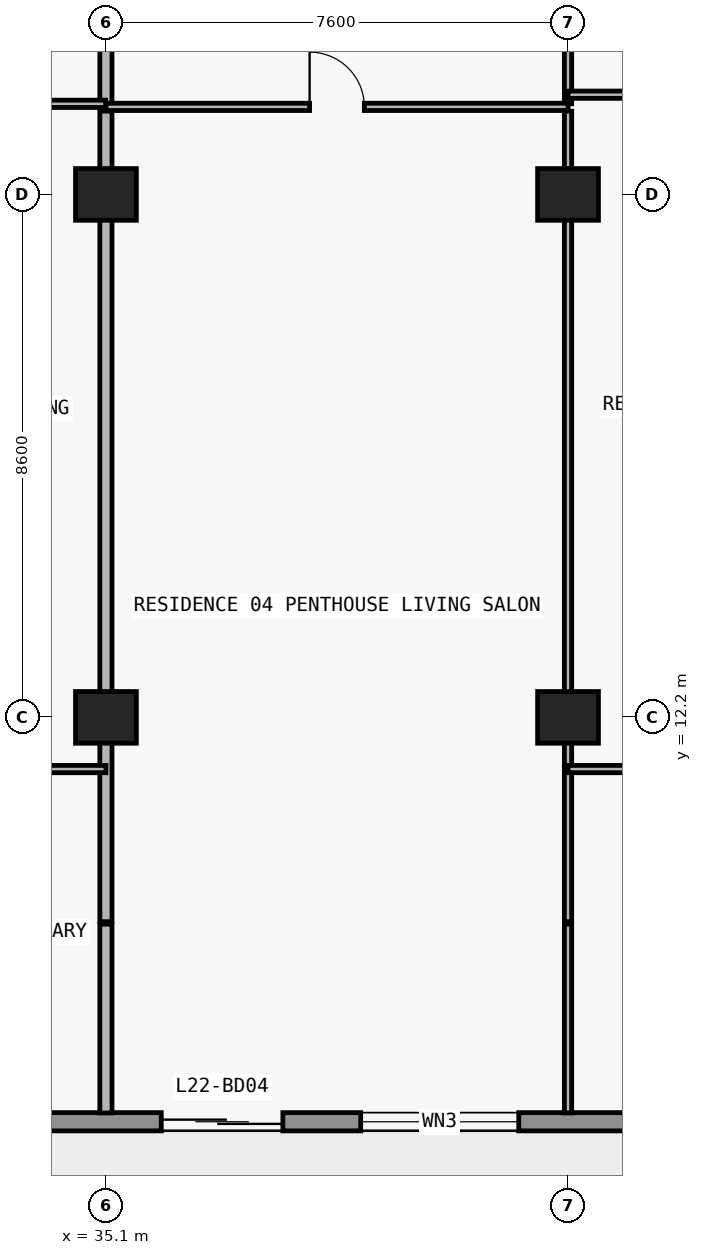
"""IFC4 building model, lengths in metres.
Left out: names, types, materials, properties, quantities, classifications, styles, units other than length and angle.
Written with IfcOpenShell. Run it as: python <this file> out.ifc"""

import sys

from ifc_helpers import new_model, si_unit, direction, frame, frame_2d, origin, origin_2d, place, context, subcontext, project, spatial, rectangle, extrude, element, fill, save


model = new_model("IFC4")
c1 = context("Model", 3, precision=1e-05, world=origin(), true_north=direction((0.0, 1.0)))
c2 = subcontext(c1, "Body", "Model", "MODEL_VIEW")
j1 = project(units=[si_unit("LENGTHUNIT", "METRE"), si_unit("PLANEANGLEUNIT", "RADIAN")], contexts=[c1])
p1 = place(None, origin())
s1 = spatial("IfcSite", under=j1, at=p1, CompositionType="ELEMENT")
p2 = place(p1, origin())
s2 = spatial("IfcBuilding", under=s1, at=p2, CompositionType="ELEMENT")
p3 = place(p2, frame((0.0, 0.0, 84.6)))
s3 = spatial("IfcBuildingStorey", under=s2, at=p3, CompositionType="ELEMENT", Elevation=84.6)
for number, where, z_axis, x_axis in (
    (1, (35.1, 12.2, 0.0), (0.0, 0.0, 1.0), (1.0, 0.0, 0.0)),
    (2, (42.7, 12.2, 0.0), (0.0, 0.0, 1.0), (1.0, 0.0, 0.0)),
    (3, (35.1, 20.8, 0.0), (0.0, 0.0, 1.0), (1.0, 0.0, 0.0)),
    (4, (42.7, 20.8, 0.0), (0.0, 0.0, 1.0), (1.0, 0.0, 0.0)),
):
    element("IfcColumn", number, at=place(p3, frame(where, z_axis=z_axis, x_axis=x_axis)), inside=s3, PredefinedType="COLUMN", context=c2, shape_type="SweptSolid", body=[
        extrude(rectangle(XDim=1.0, YDim=0.85, at=origin_2d()), origin(), (0.0, 0.0, 1.0), 3.05),
    ])
p4 = place(p3, frame((70.1, 5.55, 0.0), z_axis=(0.0, 0.0, 1.0), x_axis=(-1.0, 0.0, 0.0)))
e5 = element("IfcWall", 5, at=p4, inside=s3, PredefinedType="STANDARD", context=c2, shape_type="SweptSolid", body=[
    extrude(rectangle(XDim=62.4, YDim=0.3, at=frame_2d((31.2, 0.0))), origin(), (0.0, 0.0, 1.0), 3.05),
])
p5 = place(p4, frame((57.226, 0.0, 0.0)))
e6 = element("IfcOpeningElement", 6, at=p5, cuts=e5, PredefinedType="OPENING", context=c2, shape_type="SweptSolid", body=[
    extrude(rectangle(XDim=2.0, YDim=2.3, at=frame_2d((1.0, 1.15))), frame((0.0, 0.16, 0.0), z_axis=(0.0, -1.0, 0.0), x_axis=(1.0, 0.0, 0.0)), (0.0, 0.0, 1.0), 0.32),
])
p6 = place(p4, frame((52.926, 0.0, 0.85)))
e7 = element("IfcOpeningElement", 7, at=p6, cuts=e5, PredefinedType="OPENING", context=c2, shape_type="SweptSolid", body=[
    extrude(rectangle(XDim=2.2, YDim=1.55, at=frame_2d((1.1, 0.775))), frame((0.0, 0.16, 0.0), z_axis=(0.0, -1.0, 0.0), x_axis=(1.0, 0.0, 0.0)), (0.0, 0.0, 1.0), 0.32),
])
p7 = place(p4, frame((48.49, 0.0, 0.0)))
e8 = element("IfcOpeningElement", 8, at=p7, cuts=e5, PredefinedType="OPENING", context=c2, shape_type="SweptSolid", body=[
    extrude(rectangle(XDim=2.0, YDim=2.3, at=frame_2d((1.0, 1.15))), frame((0.0, 0.16, 0.0), z_axis=(0.0, -1.0, 0.0), x_axis=(1.0, 0.0, 0.0)), (0.0, 0.0, 1.0), 0.32),
])
p8 = place(p4, frame((44.39, 0.0, 0.85)))
e9 = element("IfcOpeningElement", 9, at=p8, cuts=e5, PredefinedType="OPENING", context=c2, shape_type="SweptSolid", body=[
    extrude(rectangle(XDim=1.8, YDim=1.55, at=frame_2d((0.9, 0.775))), frame((0.0, 0.16, 0.0), z_axis=(0.0, -1.0, 0.0), x_axis=(1.0, 0.0, 0.0)), (0.0, 0.0, 1.0), 0.32),
])
p9 = place(p4, frame((40.426, 0.0, 0.0)))
e10 = element("IfcOpeningElement", 10, at=p9, cuts=e5, PredefinedType="OPENING", context=c2, shape_type="SweptSolid", body=[
    extrude(rectangle(XDim=2.0, YDim=2.3, at=frame_2d((1.0, 1.15))), frame((0.0, 0.16, 0.0), z_axis=(0.0, -1.0, 0.0), x_axis=(1.0, 0.0, 0.0)), (0.0, 0.0, 1.0), 0.32),
])
p10 = place(p4, frame((36.126, 0.0, 0.85)))
e11 = element("IfcOpeningElement", 11, at=p10, cuts=e5, PredefinedType="OPENING", context=c2, shape_type="SweptSolid", body=[
    extrude(rectangle(XDim=2.2, YDim=1.55, at=frame_2d((1.1, 0.775))), frame((0.0, 0.16, 0.0), z_axis=(0.0, -1.0, 0.0), x_axis=(1.0, 0.0, 0.0)), (0.0, 0.0, 1.0), 0.32),
])
p11 = place(p4, frame((32.09, 0.0, 0.0)))
e12 = element("IfcOpeningElement", 12, at=p11, cuts=e5, PredefinedType="OPENING", context=c2, shape_type="SweptSolid", body=[
    extrude(rectangle(XDim=2.0, YDim=2.3, at=frame_2d((1.0, 1.15))), frame((0.0, 0.16, 0.0), z_axis=(0.0, -1.0, 0.0), x_axis=(1.0, 0.0, 0.0)), (0.0, 0.0, 1.0), 0.32),
])
p12 = place(p4, frame((28.21, 0.0, 0.65)))
e13 = element("IfcOpeningElement", 13, at=p12, cuts=e5, PredefinedType="OPENING", context=c2, shape_type="SweptSolid", body=[
    extrude(rectangle(XDim=2.6, YDim=1.85, at=frame_2d((1.3, 0.925))), frame((0.0, 0.16, 0.0), z_axis=(0.0, -1.0, 0.0), x_axis=(1.0, 0.0, 0.0)), (0.0, 0.0, 1.0), 0.32),
])
p13 = place(p4, frame((22.1, 0.0, 0.85)))
e14 = element("IfcOpeningElement", 14, at=p13, cuts=e5, PredefinedType="OPENING", context=c2, shape_type="SweptSolid", body=[
    extrude(rectangle(XDim=2.2, YDim=1.55, at=frame_2d((1.1, 0.775))), frame((0.0, 0.16, 0.0), z_axis=(0.0, -1.0, 0.0), x_axis=(1.0, 0.0, 0.0)), (0.0, 0.0, 1.0), 0.32),
])
p14 = place(p4, frame((16.026, 0.0, 0.0)))
e15 = element("IfcOpeningElement", 15, at=p14, cuts=e5, PredefinedType="OPENING", context=c2, shape_type="SweptSolid", body=[
    extrude(rectangle(XDim=2.0, YDim=2.3, at=frame_2d((1.0, 1.15))), frame((0.0, 0.16, 0.0), z_axis=(0.0, -1.0, 0.0), x_axis=(1.0, 0.0, 0.0)), (0.0, 0.0, 1.0), 0.32),
])
p15 = place(p4, frame((11.726, 0.0, 0.85)))
e16 = element("IfcOpeningElement", 16, at=p15, cuts=e5, PredefinedType="OPENING", context=c2, shape_type="SweptSolid", body=[
    extrude(rectangle(XDim=2.2, YDim=1.55, at=frame_2d((1.1, 0.775))), frame((0.0, 0.16, 0.0), z_axis=(0.0, -1.0, 0.0), x_axis=(1.0, 0.0, 0.0)), (0.0, 0.0, 1.0), 0.32),
])
p16 = place(p4, frame((7.29, 0.0, 0.0)))
e17 = element("IfcOpeningElement", 17, at=p16, cuts=e5, PredefinedType="OPENING", context=c2, shape_type="SweptSolid", body=[
    extrude(rectangle(XDim=2.0, YDim=2.3, at=frame_2d((1.0, 1.15))), frame((0.0, 0.16, 0.0), z_axis=(0.0, -1.0, 0.0), x_axis=(1.0, 0.0, 0.0)), (0.0, 0.0, 1.0), 0.32),
])
p17 = place(p4, frame((3.19, 0.0, 0.85)))
e18 = element("IfcOpeningElement", 18, at=p17, cuts=e5, PredefinedType="OPENING", context=c2, shape_type="SweptSolid", body=[
    extrude(rectangle(XDim=1.8, YDim=1.55, at=frame_2d((0.9, 0.775))), frame((0.0, 0.16, 0.0), z_axis=(0.0, -1.0, 0.0), x_axis=(1.0, 0.0, 0.0)), (0.0, 0.0, 1.0), 0.32),
])
p18 = place(p3, frame((35.1, 5.695, 0.0), z_axis=(0.0, 0.0, 1.0), x_axis=(0.0, 1.0, 0.0)))
e19 = element("IfcWall", 19, at=p18, inside=s3, PredefinedType="PARTITIONING", context=c2, shape_type="SweptSolid", body=[
    extrude(rectangle(XDim=3.105, YDim=0.2, at=frame_2d((1.552, 0.0))), origin(), (0.0, 0.0, 1.0), 3.05),
])
p19 = place(p3, frame((35.1, 8.84, 0.0), z_axis=(0.0, 0.0, 1.0), x_axis=(0.0, 1.0, 0.0)))
e20 = element("IfcWall", 20, at=p19, inside=s3, PredefinedType="PARTITIONING", context=c2, shape_type="SweptSolid", body=[
    extrude(rectangle(XDim=13.33, YDim=0.2, at=frame_2d((6.665, 0.0))), origin(), (0.0, 0.0, 1.0), 2.174),
])
p20 = place(p3, frame((35.1, 22.29, 0.0), z_axis=(0.0, 0.0, 1.0), x_axis=(0.0, 1.0, 0.0)))
e21 = element("IfcWall", 21, at=p20, inside=s3, PredefinedType="PARTITIONING", context=c2, shape_type="SweptSolid", body=[
    extrude(rectangle(XDim=4.69, YDim=0.2, at=frame_2d((2.345, 0.0))), origin(), (0.0, 0.0, 1.0), 2.174),
])
p21 = place(p3, frame((42.7, 5.695, 0.0), z_axis=(0.0, 0.0, 1.0), x_axis=(0.0, 1.0, 0.0)))
e22 = element("IfcWall", 22, at=p21, inside=s3, PredefinedType="PARTITIONING", context=c2, shape_type="SweptSolid", body=[
    extrude(rectangle(XDim=3.105, YDim=0.12, at=frame_2d((1.552, 0.0))), origin(), (0.0, 0.0, 1.0), 3.05),
])
p22 = place(p3, frame((42.7, 8.84, 0.0), z_axis=(0.0, 0.0, 1.0), x_axis=(0.0, 1.0, 0.0)))
e23 = element("IfcWall", 23, at=p22, inside=s3, PredefinedType="PARTITIONING", context=c2, shape_type="SweptSolid", body=[
    extrude(rectangle(XDim=13.33, YDim=0.12, at=frame_2d((6.665, 0.0))), origin(), (0.0, 0.0, 1.0), 2.174),
])
p23 = place(p3, frame((42.7, 22.29, 0.0), z_axis=(0.0, 0.0, 1.0), x_axis=(0.0, 1.0, 0.0)))
e24 = element("IfcWall", 24, at=p23, inside=s3, PredefinedType="PARTITIONING", context=c2, shape_type="SweptSolid", body=[
    extrude(rectangle(XDim=4.69, YDim=0.12, at=frame_2d((2.345, 0.0))), origin(), (0.0, 0.0, 1.0), 2.174),
])
p24 = place(p23, frame((1.9, 0.0, 0.0)))
e25 = element("IfcOpeningElement", 25, at=p24, cuts=e24, PredefinedType="OPENING", context=c2, shape_type="SweptSolid", body=[
    extrude(rectangle(XDim=0.9, YDim=2.124, at=frame_2d((0.45, 1.062))), frame((0.0, 0.07, 0.0), z_axis=(0.0, -1.0, 0.0), x_axis=(1.0, 0.0, 0.0)), (0.0, 0.0, 1.0), 0.14),
])
p25 = place(p3, frame((30.648, 11.35, 0.0), z_axis=(0.0, 0.0, 1.0), x_axis=(1.0, 0.0, 0.0)))
e26 = element("IfcWall", 26, at=p25, inside=s3, PredefinedType="PARTITIONING", context=c2, shape_type="SweptSolid", body=[
    extrude(rectangle(XDim=4.452, YDim=0.12, at=frame_2d((2.226, 0.0))), origin(), (0.0, 0.0, 1.0), 3.05),
])
p26 = place(p25, frame((1.776, 0.0, 0.0)))
e27 = element("IfcOpeningElement", 27, at=p26, cuts=e26, PredefinedType="OPENING", context=c2, shape_type="SweptSolid", body=[
    extrude(rectangle(XDim=0.9, YDim=2.15, at=frame_2d((0.45, 1.075))), frame((0.0, 0.07, 0.0), z_axis=(0.0, -1.0, 0.0), x_axis=(1.0, 0.0, 0.0)), (0.0, 0.0, 1.0), 0.14),
])
p27 = place(p3, frame((42.7, 11.35, 0.0), z_axis=(0.0, 0.0, 1.0), x_axis=(1.0, 0.0, 0.0)))
e28 = element("IfcWall", 28, at=p27, inside=s3, PredefinedType="PARTITIONING", context=c2, shape_type="SweptSolid", body=[
    extrude(rectangle(XDim=8.4, YDim=0.12, at=frame_2d((4.2, 0.0))), origin(), (0.0, 0.0, 1.0), 3.05),
])
p28 = place(p27, frame((3.75, 0.0, 0.0)))
e29 = element("IfcOpeningElement", 29, at=p28, cuts=e28, PredefinedType="OPENING", context=c2, shape_type="SweptSolid", body=[
    extrude(rectangle(XDim=0.9, YDim=2.15, at=frame_2d((0.45, 1.075))), frame((0.0, 0.07, 0.0), z_axis=(0.0, -1.0, 0.0), x_axis=(1.0, 0.0, 0.0)), (0.0, 0.0, 1.0), 0.14),
])
p29 = place(p3, frame((35.1, 22.24, 0.0), z_axis=(0.0, 0.0, 1.0), x_axis=(1.0, 0.0, 0.0)))
e30 = element("IfcWall", 30, at=p29, inside=s3, PredefinedType="PARTITIONING", context=c2, shape_type="SweptSolid", body=[
    extrude(rectangle(XDim=7.6, YDim=0.12, at=frame_2d((3.8, 0.0))), origin(), (0.0, 0.0, 1.0), 3.05),
])
p30 = place(p29, frame((3.35, 0.0, 0.0)))
e31 = element("IfcOpeningElement", 31, at=p30, cuts=e30, PredefinedType="OPENING", context=c2, shape_type="SweptSolid", body=[
    extrude(rectangle(XDim=0.9, YDim=2.15, at=frame_2d((0.45, 1.075))), frame((0.0, 0.07, 0.0), z_axis=(0.0, -1.0, 0.0), x_axis=(1.0, 0.0, 0.0)), (0.0, 0.0, 1.0), 0.14),
])
p31 = place(p3, frame((26.97, 22.29, 0.0), z_axis=(0.0, 0.0, 1.0), x_axis=(1.0, 0.0, 0.0)))
e32 = element("IfcWall", 32, at=p31, inside=s3, PredefinedType="PARTITIONING", context=c2, shape_type="SweptSolid", body=[
    extrude(rectangle(XDim=8.125, YDim=0.12, at=frame_2d((4.062, 0.0))), origin(), (0.0, 0.0, 1.0), 3.05),
])
p32 = place(p31, frame((1.389, 0.0, 0.0)))
e33 = element("IfcOpeningElement", 33, at=p32, cuts=e32, PredefinedType="OPENING", context=c2, shape_type="SweptSolid", body=[
    extrude(rectangle(XDim=0.9, YDim=2.15, at=frame_2d((0.45, 1.075))), frame((0.0, 0.07, 0.0), z_axis=(0.0, -1.0, 0.0), x_axis=(1.0, 0.0, 0.0)), (0.0, 0.0, 1.0), 0.14),
])
p33 = place(p31, frame((5.621, 0.0, 0.0)))
e34 = element("IfcOpeningElement", 34, at=p33, cuts=e32, PredefinedType="OPENING", context=c2, shape_type="SweptSolid", body=[
    extrude(rectangle(XDim=0.9, YDim=2.15, at=frame_2d((0.45, 1.075))), frame((0.0, 0.07, 0.0), z_axis=(0.0, -1.0, 0.0), x_axis=(1.0, 0.0, 0.0)), (0.0, 0.0, 1.0), 0.14),
])
p34 = place(p3, frame((42.7, 22.44, 0.0), z_axis=(0.0, 0.0, 1.0), x_axis=(1.0, 0.0, 0.0)))
e35 = element("IfcWall", 35, at=p34, inside=s3, PredefinedType="PARTITIONING", context=c2, shape_type="SweptSolid", body=[
    extrude(rectangle(XDim=8.13, YDim=0.12, at=frame_2d((4.065, 0.0))), origin(), (0.0, 0.0, 1.0), 3.05),
])
p35 = place(p34, frame((3.615, 0.0, 0.0)))
e36 = element("IfcOpeningElement", 36, at=p35, cuts=e35, PredefinedType="OPENING", context=c2, shape_type="SweptSolid", body=[
    extrude(rectangle(XDim=0.9, YDim=2.15, at=frame_2d((0.45, 1.075))), frame((0.0, 0.07, 0.0), z_axis=(0.0, -1.0, 0.0), x_axis=(1.0, 0.0, 0.0)), (0.0, 0.0, 1.0), 0.14),
])
p36 = place(p11, origin())
e37 = element("IfcDoor", 37, at=p36, inside=s3, OperationType="DOUBLE_DOOR_SLIDING", PredefinedType="DOOR", context=c2, shape_type="SweptSolid", body=[
    extrude(rectangle(XDim=2.0, YDim=2.3, at=frame_2d((1.0, 1.15))), frame((0.0, 0.025, 0.0), z_axis=(0.0, -1.0, 0.0), x_axis=(1.0, 0.0, 0.0)), (0.0, 0.0, 1.0), 0.05),
])
fill(e12, e37)
p37 = place(p12, origin())
e38 = element("IfcWindow", 38, at=p37, inside=s3, PartitioningType="SINGLE_PANEL", PredefinedType="WINDOW", context=c2, shape_type="SweptSolid", body=[
    extrude(rectangle(XDim=2.6, YDim=1.85, at=frame_2d((1.3, 0.925))), frame((0.0, 0.03, 0.0), z_axis=(0.0, -1.0, 0.0), x_axis=(1.0, 0.0, 0.0)), (0.0, 0.0, 1.0), 0.06),
])
fill(e13, e38)
p38 = place(p30, origin())
e39 = element("IfcDoor", 39, at=p38, inside=s3, OperationType="SINGLE_SWING_LEFT", PredefinedType="DOOR", context=c2, shape_type="SweptSolid", body=[
    extrude(rectangle(XDim=0.9, YDim=2.15, at=frame_2d((0.45, 1.075))), frame((0.0, 0.025, 0.0), z_axis=(0.0, -1.0, 0.0), x_axis=(1.0, 0.0, 0.0)), (0.0, 0.0, 1.0), 0.05),
])
fill(e31, e39)
save(model, sys.argv[1])
